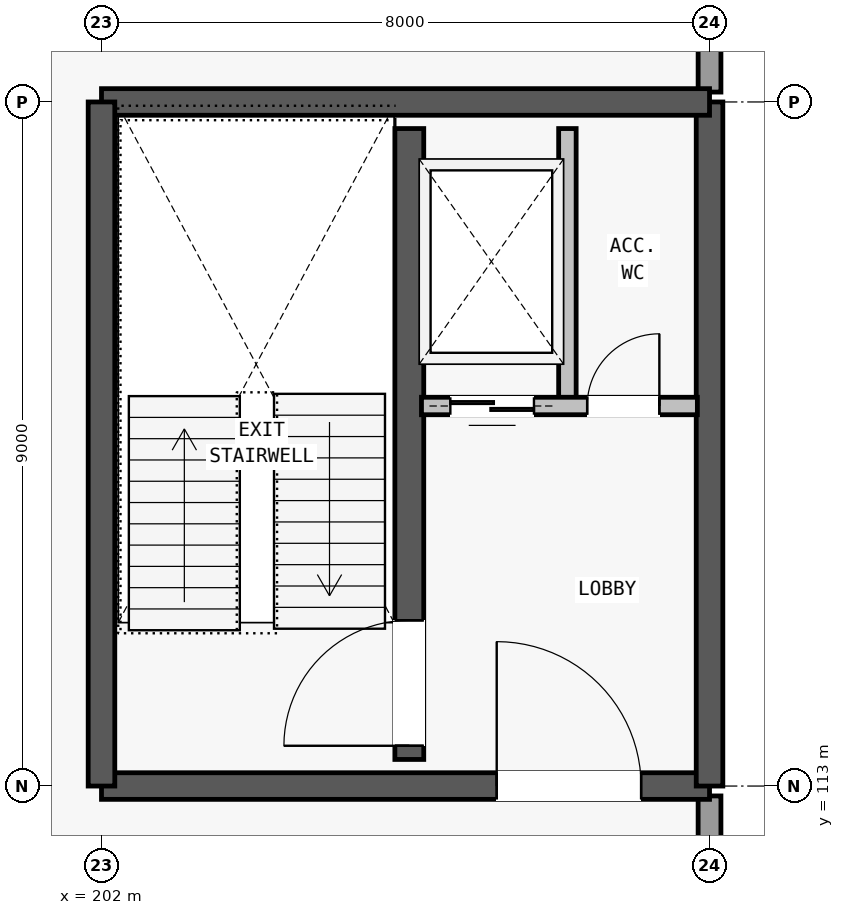
"""IFC4 building model, lengths in metres.
Left out: names, types, materials, properties, quantities, classifications, styles, units other than length and angle.
Written with IfcOpenShell. Run it as: python <this file> out.ifc"""

import sys

from ifc_helpers import new_model, si_unit, direction, frame, frame_2d, origin, place, context, subcontext, project, spatial, rectangle, extrude, element, fill, save


model = new_model("IFC4")
c1 = context("Model", 3, precision=1e-05, world=origin(), true_north=direction((0.0, 1.0)))
c2 = subcontext(c1, "Body", "Model", "MODEL_VIEW")
j1 = project(units=[si_unit("LENGTHUNIT", "METRE"), si_unit("PLANEANGLEUNIT", "RADIAN")], contexts=[c1])
p1 = place(None, origin())
s1 = spatial("IfcSite", under=j1, at=p1, CompositionType="ELEMENT")
p2 = place(p1, origin())
s2 = spatial("IfcBuilding", under=s1, at=p2, CompositionType="ELEMENT")
p3 = place(p2, frame((0.0, 0.0, 5.6)))
s3 = spatial("IfcBuildingStorey", under=s2, at=p3, CompositionType="ELEMENT", Elevation=5.6)
p4 = place(p3, frame((210.0, 104.385, 0.0), z_axis=(0.0, 0.0, 1.0), x_axis=(0.0, 1.0, 0.0)))
e1 = element("IfcWall", 1, at=p4, inside=s3, PredefinedType="STANDARD", context=c2, shape_type="SweptSolid", body=[
    extrude(rectangle(XDim=8.485, YDim=0.3, at=frame_2d((4.243, 0.0))), origin(), (0.0, 0.0, 1.0), 2.48),
])
p5 = place(p3, frame((210.0, 122.13, 0.0), z_axis=(0.0, 0.0, 1.0), x_axis=(0.0, 1.0, 0.0)))
e2 = element("IfcWall", 2, at=p5, inside=s3, PredefinedType="STANDARD", context=c2, shape_type="SweptSolid", body=[
    extrude(rectangle(XDim=8.615, YDim=0.3, at=frame_2d((4.308, 0.0))), origin(), (0.0, 0.0, 1.0), 2.48),
])
p6 = place(p5, frame((2.35, 0.0, 0.95)))
e3 = element("IfcOpeningElement", 3, at=p6, cuts=e2, PredefinedType="OPENING", context=c2, shape_type="SweptSolid", body=[
    extrude(rectangle(XDim=2.6, YDim=1.1, at=frame_2d((1.3, 0.55))), frame((0.0, 0.16, 0.0), z_axis=(0.0, -1.0, 0.0), x_axis=(1.0, 0.0, 0.0)), (0.0, 0.0, 1.0), 0.32),
])
p7 = place(p3, frame((202.0, 113.0, 0.0), z_axis=(0.0, 0.0, 1.0), x_axis=(1.0, 0.0, 0.0)))
e4 = element("IfcWall", 4, at=p7, inside=s3, PredefinedType="SHEAR", context=c2, shape_type="SweptSolid", body=[
    extrude(rectangle(XDim=8.0, YDim=0.35, at=frame_2d((4.0, 0.0))), origin(), (0.0, 0.0, 1.0), 3.62),
])
p8 = place(p7, frame((5.2, 0.0, 0.0)))
e5 = element("IfcOpeningElement", 5, at=p8, cuts=e4, PredefinedType="OPENING", context=c2, shape_type="SweptSolid", body=[
    extrude(rectangle(XDim=1.9, YDim=2.3, at=frame_2d((0.95, 1.15))), frame((0.0, 0.185, 0.0), z_axis=(0.0, -1.0, 0.0), x_axis=(1.0, 0.0, 0.0)), (0.0, 0.0, 1.0), 0.37),
])
p9 = place(p3, frame((210.0, 113.0, 0.0), z_axis=(0.0, 0.0, 1.0), x_axis=(0.0, 1.0, 0.0)))
e6 = element("IfcWall", 6, at=p9, inside=s3, PredefinedType="SHEAR", context=c2, shape_type="SweptSolid", body=[
    extrude(rectangle(XDim=9.0, YDim=0.35, at=frame_2d((4.5, 0.0))), origin(), (0.0, 0.0, 1.0), 3.62),
])
p10 = place(p3, frame((210.0, 122.0, 0.0), z_axis=(0.0, 0.0, 1.0), x_axis=(-1.0, 0.0, 0.0)))
e7 = element("IfcWall", 7, at=p10, inside=s3, PredefinedType="SHEAR", context=c2, shape_type="SweptSolid", body=[
    extrude(rectangle(XDim=8.0, YDim=0.35, at=frame_2d((4.0, 0.0))), origin(), (0.0, 0.0, 1.0), 3.62),
])
p11 = place(p3, frame((202.0, 122.0, 0.0), z_axis=(0.0, 0.0, 1.0), x_axis=(0.0, -1.0, 0.0)))
e8 = element("IfcWall", 8, at=p11, inside=s3, PredefinedType="SHEAR", context=c2, shape_type="SweptSolid", body=[
    extrude(rectangle(XDim=9.0, YDim=0.35, at=frame_2d((4.5, 0.0))), origin(), (0.0, 0.0, 1.0), 3.62),
])
p12 = place(p3, frame((206.05, 113.35, 0.0), z_axis=(0.0, 0.0, 1.0), x_axis=(0.0, 1.0, 0.0)))
e9 = element("IfcWall", 9, at=p12, inside=s3, PredefinedType="SHEAR", context=c2, shape_type="SweptSolid", body=[
    extrude(rectangle(XDim=8.3, YDim=0.38, at=frame_2d((4.15, 0.0))), origin(), (0.0, 0.0, 1.0), 3.62),
])
p13 = place(p12, frame((0.18, 0.0, 0.0)))
e10 = element("IfcOpeningElement", 10, at=p13, cuts=e9, PredefinedType="OPENING", context=c2, shape_type="SweptSolid", body=[
    extrude(rectangle(XDim=1.65, YDim=2.2, at=frame_2d((0.825, 1.1))), frame((0.0, 0.2, 0.0), z_axis=(0.0, -1.0, 0.0), x_axis=(1.0, 0.0, 0.0)), (0.0, 0.0, 1.0), 0.4),
])
p14 = place(p3, frame((208.13, 118.0, 0.0), z_axis=(0.0, 0.0, 1.0), x_axis=(0.0, 1.0, 0.0)))
e11 = element("IfcWall", 11, at=p14, inside=s3, PredefinedType="PARTITIONING", context=c2, shape_type="SweptSolid", body=[
    extrude(rectangle(XDim=3.65, YDim=0.23, at=frame_2d((1.825, 0.0))), origin(), (0.0, 0.0, 1.0), 2.48),
])
p15 = place(p3, frame((206.21, 118.0, 0.0), z_axis=(0.0, 0.0, 1.0), x_axis=(1.0, 0.0, 0.0)))
e12 = element("IfcWall", 12, at=p15, inside=s3, PredefinedType="PARTITIONING", context=c2, shape_type="SweptSolid", body=[
    extrude(rectangle(XDim=3.63, YDim=0.23, at=frame_2d((1.815, 0.0))), origin(), (0.0, 0.0, 1.0), 2.48),
])
p16 = place(p15, frame((0.38, 0.0, 0.0)))
e13 = element("IfcOpeningElement", 13, at=p16, cuts=e12, PredefinedType="OPENING", context=c2, shape_type="SweptSolid", body=[
    extrude(rectangle(XDim=1.1, YDim=2.15, at=frame_2d((0.55, 1.075))), frame((0.0, 0.125, 0.0), z_axis=(0.0, -1.0, 0.0), x_axis=(1.0, 0.0, 0.0)), (0.0, 0.0, 1.0), 0.25),
])
p17 = place(p15, frame((2.18, 0.0, 0.0)))
e14 = element("IfcOpeningElement", 14, at=p17, cuts=e12, PredefinedType="OPENING", context=c2, shape_type="SweptSolid", body=[
    extrude(rectangle(XDim=0.95, YDim=2.1, at=frame_2d((0.475, 1.05))), frame((0.0, 0.125, 0.0), z_axis=(0.0, -1.0, 0.0), x_axis=(1.0, 0.0, 0.0)), (0.0, 0.0, 1.0), 0.25),
])
p18 = place(p8, origin())
e15 = element("IfcDoor", 15, at=p18, inside=s3, OperationType="SINGLE_SWING_LEFT", PredefinedType="DOOR", context=c2, shape_type="SweptSolid", body=[
    extrude(rectangle(XDim=1.9, YDim=2.3, at=frame_2d((0.95, 1.15))), frame((0.0, 0.025, 0.0), z_axis=(0.0, -1.0, 0.0), x_axis=(1.0, 0.0, 0.0)), (0.0, 0.0, 1.0), 0.05),
])
fill(e5, e15)
p19 = place(p13, origin())
e16 = element("IfcDoor", 16, at=p19, inside=s3, OperationType="SINGLE_SWING_LEFT", PredefinedType="DOOR", context=c2, shape_type="SweptSolid", body=[
    extrude(rectangle(XDim=1.65, YDim=2.2, at=frame_2d((0.825, 1.1))), frame((0.0, 0.025, 0.0), z_axis=(0.0, -1.0, 0.0), x_axis=(1.0, 0.0, 0.0)), (0.0, 0.0, 1.0), 0.05),
])
fill(e10, e16)
p20 = place(p16, origin())
e17 = element("IfcDoor", 17, at=p20, inside=s3, OperationType="SLIDING_TO_LEFT", PredefinedType="DOOR", context=c2, shape_type="SweptSolid", body=[
    extrude(rectangle(XDim=1.1, YDim=2.15, at=frame_2d((0.55, 1.075))), frame((0.0, 0.025, 0.0), z_axis=(0.0, -1.0, 0.0), x_axis=(1.0, 0.0, 0.0)), (0.0, 0.0, 1.0), 0.05),
])
fill(e13, e17)
p21 = place(p17, origin())
e18 = element("IfcDoor", 18, at=p21, inside=s3, OperationType="SINGLE_SWING_RIGHT", PredefinedType="DOOR", context=c2, shape_type="SweptSolid", body=[
    extrude(rectangle(XDim=0.95, YDim=2.1, at=frame_2d((0.475, 1.05))), frame((0.0, 0.025, 0.0), z_axis=(0.0, -1.0, 0.0), x_axis=(1.0, 0.0, 0.0)), (0.0, 0.0, 1.0), 0.05),
])
fill(e14, e18)
save(model, sys.argv[1])
